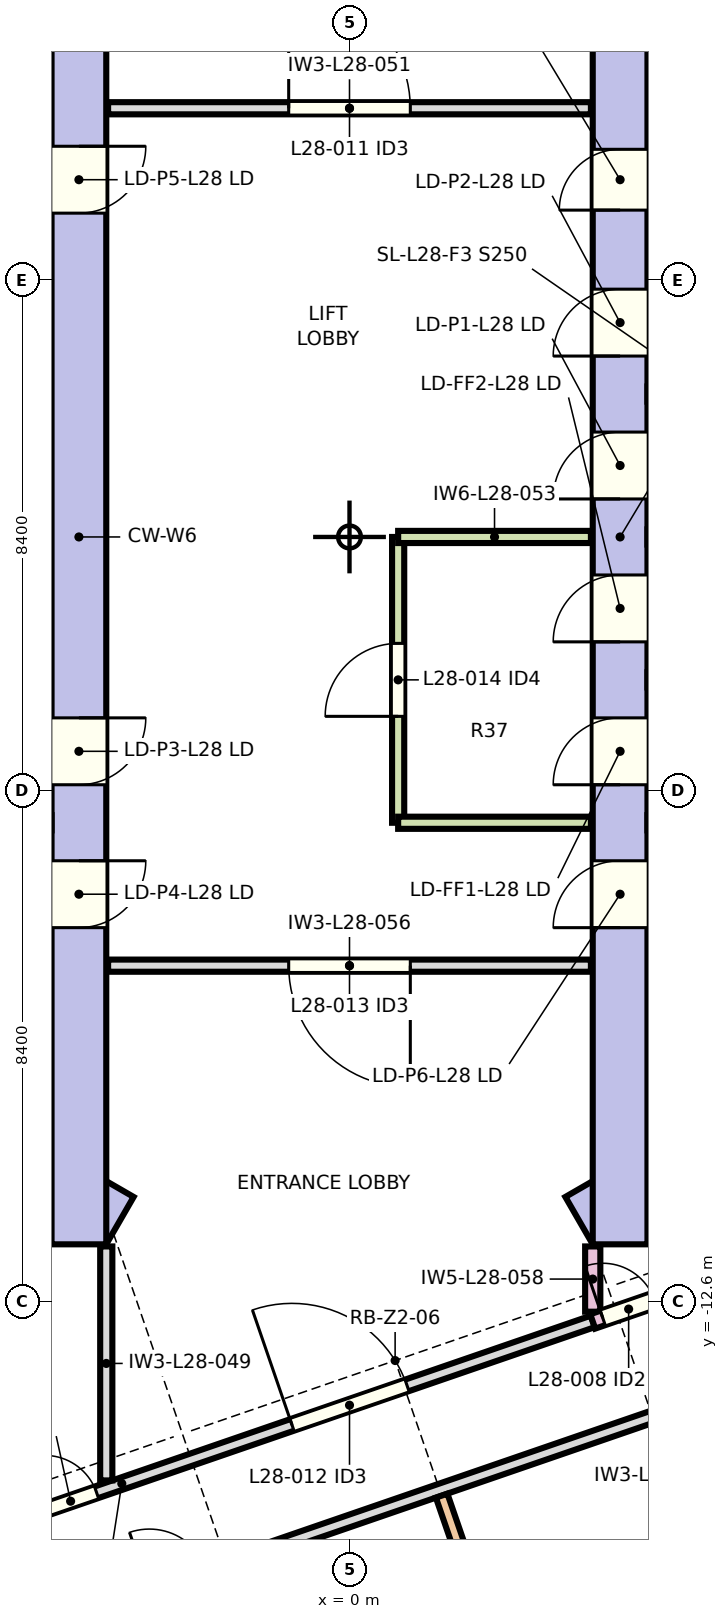
"""IFC4 building model, lengths in metres.
Left out: names, types, materials, properties, quantities, classifications, styles, units other than length and angle.
Written with IfcOpenShell. Run it as: python <this file> out.ifc"""

import sys

from ifc_helpers import new_model, si_unit, direction, frame, frame_2d, origin, place, context, subcontext, project, spatial, rectangle, extrude, element, fill, save


model = new_model("IFC4")
c1 = context("Model", 3, precision=1e-05, world=origin(), true_north=direction((0.0, 1.0)))
c2 = subcontext(c1, "Body", "Model", "MODEL_VIEW")
j1 = project(units=[si_unit("LENGTHUNIT", "METRE"), si_unit("PLANEANGLEUNIT", "RADIAN")], contexts=[c1])
p1 = place(None, origin())
s1 = spatial("IfcSite", under=j1, at=p1, CompositionType="ELEMENT")
p2 = place(p1, origin())
s2 = spatial("IfcBuilding", under=s1, at=p2, CompositionType="ELEMENT")
p3 = place(p2, frame((0.0, 0.0, 134.5)))
s3 = spatial("IfcBuildingStorey", under=s2, at=p3, CompositionType="ELEMENT", Elevation=134.5)
p4 = place(p3, frame((-3.775, -11.243, 0.0), z_axis=(0.0, 0.0, 1.0), x_axis=(-0.866026961591, 0.49999730179, 0.0)))
e1 = element("IfcWall", 1, at=p4, inside=s3, PredefinedType="SHEAR", context=c2, shape_type="SweptSolid", body=[
    extrude(rectangle(XDim=5.587, YDim=0.9, at=frame_2d((2.794, 0.0))), origin(), (0.0, 0.0, 1.0), 3.8),
])
p5 = place(p3, frame((-4.45, 11.633, 0.0), z_axis=(0.0, 0.0, 1.0), x_axis=(0.0, -1.0, 0.0)))
e2 = element("IfcWall", 2, at=p5, inside=s3, PredefinedType="SHEAR", context=c2, shape_type="SweptSolid", body=[
    extrude(rectangle(XDim=23.265, YDim=0.9, at=frame_2d((11.633, 0.0))), origin(), (0.0, 0.0, 1.0), 3.8),
])
p6 = place(p5, frame((14.607, 0.0, 0.0)))
e3 = element("IfcOpeningElement", 3, at=p6, cuts=e2, PredefinedType="OPENING", context=c2, shape_type="SweptSolid", body=[
    extrude(rectangle(XDim=1.1, YDim=2.1, at=frame_2d((0.55, 1.05))), frame((0.0, 0.46, 0.0), z_axis=(0.0, -1.0, 0.0), x_axis=(1.0, 0.0, 0.0)), (0.0, 0.0, 1.0), 0.92),
])
p7 = place(p5, frame((16.958, 0.0, 0.0)))
e4 = element("IfcOpeningElement", 4, at=p7, cuts=e2, PredefinedType="OPENING", context=c2, shape_type="SweptSolid", body=[
    extrude(rectangle(XDim=1.1, YDim=2.1, at=frame_2d((0.55, 1.05))), frame((0.0, 0.46, 0.0), z_axis=(0.0, -1.0, 0.0), x_axis=(1.0, 0.0, 0.0)), (0.0, 0.0, 1.0), 0.92),
])
p8 = place(p5, frame((5.208, 0.0, 0.0)))
e5 = element("IfcOpeningElement", 5, at=p8, cuts=e2, PredefinedType="OPENING", context=c2, shape_type="SweptSolid", body=[
    extrude(rectangle(XDim=1.1, YDim=2.1, at=frame_2d((0.55, 1.05))), frame((0.0, 0.46, 0.0), z_axis=(0.0, -1.0, 0.0), x_axis=(1.0, 0.0, 0.0)), (0.0, 0.0, 1.0), 0.92),
])
p9 = place(p3, frame((8.614, -8.449, 0.0), z_axis=(0.0, 0.0, 1.0), x_axis=(-0.866026961591, -0.49999730179, 0.0)))
e6 = element("IfcWall", 6, at=p9, inside=s3, PredefinedType="SHEAR", context=c2, shape_type="SweptSolid", body=[
    extrude(rectangle(XDim=5.587, YDim=0.9, at=frame_2d((2.794, 0.0))), origin(), (0.0, 0.0, 1.0), 3.8),
])
p10 = place(p3, frame((4.45, -11.633, 0.0), z_axis=(0.0, 0.0, 1.0), x_axis=(0.0, 1.0, 0.0)))
e7 = element("IfcWall", 7, at=p10, inside=s3, PredefinedType="SHEAR", context=c2, shape_type="SweptSolid", body=[
    extrude(rectangle(XDim=23.265, YDim=0.9, at=frame_2d((11.633, 0.0))), origin(), (0.0, 0.0, 1.0), 3.8),
])
p11 = place(p10, frame((7.558, 0.0, 0.0)))
e8 = element("IfcOpeningElement", 8, at=p11, cuts=e7, PredefinedType="OPENING", context=c2, shape_type="SweptSolid", body=[
    extrude(rectangle(XDim=1.1, YDim=2.1, at=frame_2d((0.55, 1.05))), frame((0.0, 0.46, 0.0), z_axis=(0.0, -1.0, 0.0), x_axis=(1.0, 0.0, 0.0)), (0.0, 0.0, 1.0), 0.92),
])
p12 = place(p10, frame((9.907, 0.0, 0.0)))
e9 = element("IfcOpeningElement", 9, at=p12, cuts=e7, PredefinedType="OPENING", context=c2, shape_type="SweptSolid", body=[
    extrude(rectangle(XDim=1.1, YDim=2.1, at=frame_2d((0.55, 1.05))), frame((0.0, 0.46, 0.0), z_axis=(0.0, -1.0, 0.0), x_axis=(1.0, 0.0, 0.0)), (0.0, 0.0, 1.0), 0.92),
])
p13 = place(p10, frame((12.258, 0.0, 0.0)))
e10 = element("IfcOpeningElement", 10, at=p13, cuts=e7, PredefinedType="OPENING", context=c2, shape_type="SweptSolid", body=[
    extrude(rectangle(XDim=1.1, YDim=2.1, at=frame_2d((0.55, 1.05))), frame((0.0, 0.46, 0.0), z_axis=(0.0, -1.0, 0.0), x_axis=(1.0, 0.0, 0.0)), (0.0, 0.0, 1.0), 0.92),
])
p14 = place(p10, frame((14.607, 0.0, 0.0)))
e11 = element("IfcOpeningElement", 11, at=p14, cuts=e7, PredefinedType="OPENING", context=c2, shape_type="SweptSolid", body=[
    extrude(rectangle(XDim=1.1, YDim=2.1, at=frame_2d((0.55, 1.05))), frame((0.0, 0.46, 0.0), z_axis=(0.0, -1.0, 0.0), x_axis=(1.0, 0.0, 0.0)), (0.0, 0.0, 1.0), 0.92),
])
p15 = place(p10, frame((5.208, 0.0, 0.0)))
e12 = element("IfcOpeningElement", 12, at=p15, cuts=e7, PredefinedType="OPENING", context=c2, shape_type="SweptSolid", body=[
    extrude(rectangle(XDim=1.1, YDim=2.1, at=frame_2d((0.55, 1.05))), frame((0.0, 0.46, 0.0), z_axis=(0.0, -1.0, 0.0), x_axis=(1.0, 0.0, 0.0)), (0.0, 0.0, 1.0), 0.92),
])
p16 = place(p10, frame((17.008, 0.0, 0.0)))
e13 = element("IfcOpeningElement", 13, at=p16, cuts=e7, PredefinedType="OPENING", context=c2, shape_type="SweptSolid", body=[
    extrude(rectangle(XDim=1.0, YDim=2.1, at=frame_2d((0.5, 1.05))), frame((0.0, 0.46, 0.0), z_axis=(0.0, -1.0, 0.0), x_axis=(1.0, 0.0, 0.0)), (0.0, 0.0, 1.0), 0.92),
])
p17 = place(p3, frame((-12.586, -20.515, 0.0), z_axis=(0.0, 0.0, 1.0), x_axis=(0.945519939336, 0.325564193852, 0.0)))
e14 = element("IfcWall", 14, at=p17, inside=s3, PredefinedType="PARTITIONING", context=c2, shape_type="SweptSolid", body=[
    extrude(rectangle(XDim=37.28, YDim=0.2, at=frame_2d((18.64, 0.0))), origin(), (0.0, 0.0, 1.0), 3.55),
])
p18 = place(p17, frame((9.83, 0.0, 0.0)))
e15 = element("IfcOpeningElement", 15, at=p18, cuts=e14, PredefinedType="OPENING", context=c2, shape_type="SweptSolid", body=[
    extrude(rectangle(XDim=1.0, YDim=2.1, at=frame_2d((0.5, 1.05))), frame((0.0, 0.11, 0.0), z_axis=(0.0, -1.0, 0.0), x_axis=(1.0, 0.0, 0.0)), (0.0, 0.0, 1.0), 0.22),
])
p19 = place(p17, frame((18.93, 0.0, 0.0)))
e16 = element("IfcOpeningElement", 16, at=p19, cuts=e14, PredefinedType="OPENING", context=c2, shape_type="SweptSolid", body=[
    extrude(rectangle(XDim=1.0, YDim=2.1, at=frame_2d((0.5, 1.05))), frame((0.0, 0.11, 0.0), z_axis=(0.0, -1.0, 0.0), x_axis=(1.0, 0.0, 0.0)), (0.0, 0.0, 1.0), 0.22),
])
p20 = place(p17, frame((30.28, 0.0, 0.0)))
e17 = element("IfcOpeningElement", 17, at=p20, cuts=e14, PredefinedType="OPENING", context=c2, shape_type="SweptSolid", body=[
    extrude(rectangle(XDim=1.0, YDim=2.1, at=frame_2d((0.5, 1.05))), frame((0.0, 0.11, 0.0), z_axis=(0.0, -1.0, 0.0), x_axis=(1.0, 0.0, 0.0)), (0.0, 0.0, 1.0), 0.22),
])
p21 = place(p17, frame((0.13, 0.0, 0.0)))
e18 = element("IfcOpeningElement", 18, at=p21, cuts=e14, PredefinedType="OPENING", context=c2, shape_type="SweptSolid", body=[
    extrude(rectangle(XDim=1.0, YDim=2.1, at=frame_2d((0.5, 1.05))), frame((0.0, 0.11, 0.0), z_axis=(0.0, -1.0, 0.0), x_axis=(1.0, 0.0, 0.0)), (0.0, 0.0, 1.0), 0.22),
])
p22 = place(p17, frame((34.23, 0.0, 0.0)))
e19 = element("IfcOpeningElement", 19, at=p22, cuts=e14, PredefinedType="OPENING", context=c2, shape_type="SweptSolid", body=[
    extrude(rectangle(XDim=1.1, YDim=2.1, at=frame_2d((0.55, 1.05))), frame((0.0, 0.11, 0.0), z_axis=(0.0, -1.0, 0.0), x_axis=(1.0, 0.0, 0.0)), (0.0, 0.0, 1.0), 0.22),
])
p23 = place(p3, frame((-11.49, -18.234, 0.0), z_axis=(0.0, 0.0, 1.0), x_axis=(0.945522545762, 0.325556624039, 0.0)))
e20 = element("IfcWall", 20, at=p23, inside=s3, PredefinedType="PARTITIONING", context=c2, shape_type="SweptSolid", body=[
    extrude(rectangle(XDim=16.382, YDim=0.2, at=frame_2d((8.191, 0.0))), origin(), (0.0, 0.0, 1.0), 3.55),
])
p24 = place(p23, frame((6.851, 0.0, 0.0)))
e21 = element("IfcOpeningElement", 21, at=p24, cuts=e20, PredefinedType="OPENING", context=c2, shape_type="SweptSolid", body=[
    extrude(rectangle(XDim=0.9, YDim=2.1, at=frame_2d((0.45, 1.05))), frame((0.0, 0.11, 0.0), z_axis=(0.0, -1.0, 0.0), x_axis=(1.0, 0.0, 0.0)), (0.0, 0.0, 1.0), 0.22),
])
p25 = place(p23, frame((11.152, 0.0, 0.0)))
e22 = element("IfcOpeningElement", 22, at=p25, cuts=e20, PredefinedType="OPENING", context=c2, shape_type="SweptSolid", body=[
    extrude(rectangle(XDim=2.0, YDim=2.1, at=frame_2d((1.0, 1.05))), frame((0.0, 0.11, 0.0), z_axis=(0.0, -1.0, 0.0), x_axis=(1.0, 0.0, 0.0)), (0.0, 0.0, 1.0), 0.22),
])
p26 = place(p3, frame((-4.0, -11.667, 0.0), z_axis=(0.0, 0.0, 1.0), x_axis=(0.0, -1.0, 0.0)))
e23 = element("IfcWall", 23, at=p26, inside=s3, PredefinedType="PARTITIONING", context=c2, shape_type="SweptSolid", body=[
    extrude(rectangle(XDim=3.848, YDim=0.2, at=frame_2d((1.924, 0.0))), origin(), (0.0, 0.0, 1.0), 3.55),
])
p27 = place(p3, frame((-3.97, 7.05, 0.0), z_axis=(0.0, 0.0, 1.0), x_axis=(1.0, 0.0, 0.0)))
e24 = element("IfcWall", 24, at=p27, inside=s3, PredefinedType="PARTITIONING", context=c2, shape_type="SweptSolid", body=[
    extrude(rectangle(XDim=7.94, YDim=0.2, at=frame_2d((3.97, 0.0))), origin(), (0.0, 0.0, 1.0), 3.55),
])
p28 = place(p27, frame((2.97, 0.0, 0.0)))
e25 = element("IfcOpeningElement", 25, at=p28, cuts=e24, PredefinedType="OPENING", context=c2, shape_type="SweptSolid", body=[
    extrude(rectangle(XDim=2.0, YDim=2.1, at=frame_2d((1.0, 1.05))), frame((0.0, 0.11, 0.0), z_axis=(0.0, -1.0, 0.0), x_axis=(1.0, 0.0, 0.0)), (0.0, 0.0, 1.0), 0.22),
])
p29 = place(p3, frame((0.8, -4.7, 0.0), z_axis=(0.0, 0.0, 1.0), x_axis=(0.0, 1.0, 0.0)))
e26 = element("IfcWall", 26, at=p29, inside=s3, PredefinedType="SOLIDWALL", context=c2, shape_type="SweptSolid", body=[
    extrude(rectangle(XDim=4.7, YDim=0.2, at=frame_2d((2.35, 0.0))), origin(), (0.0, 0.0, 1.0), 3.55),
])
p30 = place(p29, frame((1.75, 0.0, 0.0)))
e27 = element("IfcOpeningElement", 27, at=p30, cuts=e26, PredefinedType="OPENING", context=c2, shape_type="SweptSolid", body=[
    extrude(rectangle(XDim=1.2, YDim=2.1, at=frame_2d((0.6, 1.05))), frame((0.0, 0.11, 0.0), z_axis=(0.0, -1.0, 0.0), x_axis=(1.0, 0.0, 0.0)), (0.0, 0.0, 1.0), 0.22),
])
p31 = place(p3, frame((0.8, 0.0, 0.0), z_axis=(0.0, 0.0, 1.0), x_axis=(1.0, 0.0, 0.0)))
e28 = element("IfcWall", 28, at=p31, inside=s3, PredefinedType="SOLIDWALL", context=c2, shape_type="SweptSolid", body=[
    extrude(rectangle(XDim=3.17, YDim=0.2, at=frame_2d((1.585, 0.0))), origin(), (0.0, 0.0, 1.0), 3.55),
])
p32 = place(p3, frame((1.515, -15.766, 0.0), z_axis=(0.0, 0.0, 1.0), x_axis=(0.325563917555, -0.945520034471, 0.0)))
e29 = element("IfcWall", 29, at=p32, inside=s3, PredefinedType="PARTITIONING", context=c2, shape_type="SweptSolid", body=[
    extrude(rectangle(XDim=7.37, YDim=0.2, at=frame_2d((3.685, 0.0))), origin(), (0.0, 0.0, 1.0), 3.05),
])
p33 = place(p3, frame((3.97, -7.05, 0.0), z_axis=(0.0, 0.0, 1.0), x_axis=(-1.0, 0.0, 0.0)))
e30 = element("IfcWall", 30, at=p33, inside=s3, PredefinedType="PARTITIONING", context=c2, shape_type="SweptSolid", body=[
    extrude(rectangle(XDim=7.94, YDim=0.2, at=frame_2d((3.97, 0.0))), origin(), (0.0, 0.0, 1.0), 3.55),
])
p34 = place(p33, frame((2.97, 0.0, 0.0)))
e31 = element("IfcOpeningElement", 31, at=p34, cuts=e30, PredefinedType="OPENING", context=c2, shape_type="SweptSolid", body=[
    extrude(rectangle(XDim=2.0, YDim=2.1, at=frame_2d((1.0, 1.05))), frame((0.0, 0.11, 0.0), z_axis=(0.0, -1.0, 0.0), x_axis=(1.0, 0.0, 0.0)), (0.0, 0.0, 1.0), 0.22),
])
p35 = place(p3, frame((3.97, -4.7, 0.0), z_axis=(0.0, 0.0, 1.0), x_axis=(-1.0, 0.0, 0.0)))
e32 = element("IfcWall", 32, at=p35, inside=s3, PredefinedType="SOLIDWALL", context=c2, shape_type="SweptSolid", body=[
    extrude(rectangle(XDim=3.17, YDim=0.2, at=frame_2d((1.585, 0.0))), origin(), (0.0, 0.0, 1.0), 3.55),
])
p36 = place(p3, frame((4.0, -12.74, 0.0), z_axis=(0.0, 0.0, 1.0), x_axis=(0.0, 1.0, 0.0)))
e33 = element("IfcWall", 33, at=p36, inside=s3, PredefinedType="SOLIDWALL", context=c2, shape_type="SweptSolid", body=[
    extrude(rectangle(XDim=1.073, YDim=0.25, at=frame_2d((0.537, 0.0))), origin(), (0.0, 0.0, 1.0), 3.55),
])
p37 = place(p3, frame((4.0, -12.901, 0.0), z_axis=(0.0, 0.0, 1.0), x_axis=(0.945515789626, 0.325576245398, 0.0)))
e34 = element("IfcWall", 34, at=p37, inside=s3, PredefinedType="SOLIDWALL", context=c2, shape_type="SweptSolid", body=[
    extrude(rectangle(XDim=12.491, YDim=0.25, at=frame_2d((6.246, 0.0))), origin(), (0.0, 0.0, 1.0), 3.55),
])
p38 = place(p37, frame((0.175, 0.0, 0.0)))
e35 = element("IfcOpeningElement", 35, at=p38, cuts=e34, PredefinedType="OPENING", context=c2, shape_type="SweptSolid", body=[
    extrude(rectangle(XDim=0.9, YDim=2.1, at=frame_2d((0.45, 1.05))), frame((0.0, 0.135, 0.0), z_axis=(0.0, -1.0, 0.0), x_axis=(1.0, 0.0, 0.0)), (0.0, 0.0, 1.0), 0.27),
])
p39 = place(p37, frame((5.796, 0.0, 0.0)))
e36 = element("IfcOpeningElement", 36, at=p39, cuts=e34, PredefinedType="OPENING", context=c2, shape_type="SweptSolid", body=[
    extrude(rectangle(XDim=0.9, YDim=2.1, at=frame_2d((0.45, 1.05))), frame((0.0, 0.135, 0.0), z_axis=(0.0, -1.0, 0.0), x_axis=(1.0, 0.0, 0.0)), (0.0, 0.0, 1.0), 0.27),
])
p40 = place(p3, frame((4.599, 15.862, 0.0), z_axis=(0.0, 0.0, 1.0), x_axis=(-0.94551912499, -0.325566558907, 0.0)))
e37 = element("IfcWall", 37, at=p40, inside=s3, PredefinedType="PARTITIONING", context=c2, shape_type="SweptSolid", body=[
    extrude(rectangle(XDim=26.293, YDim=0.2, at=frame_2d((13.146, 0.0))), origin(), (0.0, 0.0, 1.0), 3.55),
])
p41 = place(p40, frame((10.81, 0.0, 0.0)))
e38 = element("IfcOpeningElement", 38, at=p41, cuts=e37, PredefinedType="OPENING", context=c2, shape_type="SweptSolid", body=[
    extrude(rectangle(XDim=0.9, YDim=2.1, at=frame_2d((0.45, 1.05))), frame((0.0, 0.11, 0.0), z_axis=(0.0, -1.0, 0.0), x_axis=(1.0, 0.0, 0.0)), (0.0, 0.0, 1.0), 0.22),
])
p42 = place(p40, frame((3.865, 0.0, 0.0)))
e39 = element("IfcOpeningElement", 39, at=p42, cuts=e37, PredefinedType="OPENING", context=c2, shape_type="SweptSolid", body=[
    extrude(rectangle(XDim=2.0, YDim=2.1, at=frame_2d((1.0, 1.05))), frame((0.0, 0.11, 0.0), z_axis=(0.0, -1.0, 0.0), x_axis=(1.0, 0.0, 0.0)), (0.0, 0.0, 1.0), 0.22),
])
for number, where, z_axis, x_axis in (
    (40, (4.9, -4.7, 0.0), (0.0, 0.0, 1.0), (1.0, 0.0, 0.0)),
    (41, (4.9, 0.0, 0.0), (0.0, 0.0, 1.0), (1.0, 0.0, 0.0)),
):
    element("IfcWall", number, at=place(p3, frame(where, z_axis=z_axis, x_axis=x_axis)), inside=s3, PredefinedType="SOLIDWALL", context=c2, shape_type="SweptSolid", body=[
        extrude(rectangle(XDim=2.675, YDim=0.25, at=frame_2d((1.337, 0.0))), origin(), (0.0, 0.0, 1.0), 3.55),
    ])
p43 = place(p24, origin())
e42 = element("IfcDoor", 42, at=p43, inside=s3, OperationType="NOTDEFINED", PredefinedType="DOOR", context=c2, shape_type="SweptSolid", body=[
    extrude(rectangle(XDim=0.9, YDim=2.1, at=frame_2d((0.45, 1.05))), frame((0.0, 0.025, 0.0), z_axis=(0.0, -1.0, 0.0), x_axis=(1.0, 0.0, 0.0)), (0.0, 0.0, 1.0), 0.05),
])
fill(e21, e42)
p44 = place(p38, origin())
e43 = element("IfcDoor", 43, at=p44, inside=s3, OperationType="NOTDEFINED", PredefinedType="DOOR", context=c2, shape_type="SweptSolid", body=[
    extrude(rectangle(XDim=0.9, YDim=2.1, at=frame_2d((0.45, 1.05))), frame((0.0, 0.025, 0.0), z_axis=(0.0, -1.0, 0.0), x_axis=(1.0, 0.0, 0.0)), (0.0, 0.0, 1.0), 0.05),
])
fill(e35, e43)
p45 = place(p28, origin())
e44 = element("IfcDoor", 44, at=p45, inside=s3, OperationType="NOTDEFINED", PredefinedType="DOOR", context=c2, shape_type="SweptSolid", body=[
    extrude(rectangle(XDim=2.0, YDim=2.1, at=frame_2d((1.0, 1.05))), frame((0.0, 0.025, 0.0), z_axis=(0.0, -1.0, 0.0), x_axis=(1.0, 0.0, 0.0)), (0.0, 0.0, 1.0), 0.05),
])
fill(e25, e44)
p46 = place(p25, origin())
e45 = element("IfcDoor", 45, at=p46, inside=s3, OperationType="NOTDEFINED", PredefinedType="DOOR", context=c2, shape_type="SweptSolid", body=[
    extrude(rectangle(XDim=2.0, YDim=2.1, at=frame_2d((1.0, 1.05))), frame((0.0, 0.025, 0.0), z_axis=(0.0, -1.0, 0.0), x_axis=(1.0, 0.0, 0.0)), (0.0, 0.0, 1.0), 0.05),
])
fill(e22, e45)
p47 = place(p34, origin())
e46 = element("IfcDoor", 46, at=p47, inside=s3, OperationType="NOTDEFINED", PredefinedType="DOOR", context=c2, shape_type="SweptSolid", body=[
    extrude(rectangle(XDim=2.0, YDim=2.1, at=frame_2d((1.0, 1.05))), frame((0.0, 0.025, 0.0), z_axis=(0.0, -1.0, 0.0), x_axis=(1.0, 0.0, 0.0)), (0.0, 0.0, 1.0), 0.05),
])
fill(e31, e46)
p48 = place(p30, origin())
e47 = element("IfcDoor", 47, at=p48, inside=s3, OperationType="NOTDEFINED", PredefinedType="DOOR", context=c2, shape_type="SweptSolid", body=[
    extrude(rectangle(XDim=1.2, YDim=2.1, at=frame_2d((0.6, 1.05))), frame((0.0, 0.025, 0.0), z_axis=(0.0, -1.0, 0.0), x_axis=(1.0, 0.0, 0.0)), (0.0, 0.0, 1.0), 0.05),
])
fill(e27, e47)
p49 = place(p11, origin())
e48 = element("IfcDoor", 48, at=p49, inside=s3, OperationType="SLIDING_TO_LEFT", PredefinedType="DOOR", context=c2, shape_type="SweptSolid", body=[
    extrude(rectangle(XDim=1.1, YDim=2.1, at=frame_2d((0.55, 1.05))), frame((0.0, 0.025, 0.0), z_axis=(0.0, -1.0, 0.0), x_axis=(1.0, 0.0, 0.0)), (0.0, 0.0, 1.0), 0.05),
])
fill(e8, e48)
p50 = place(p12, origin())
e49 = element("IfcDoor", 49, at=p50, inside=s3, OperationType="SLIDING_TO_LEFT", PredefinedType="DOOR", context=c2, shape_type="SweptSolid", body=[
    extrude(rectangle(XDim=1.1, YDim=2.1, at=frame_2d((0.55, 1.05))), frame((0.0, 0.025, 0.0), z_axis=(0.0, -1.0, 0.0), x_axis=(1.0, 0.0, 0.0)), (0.0, 0.0, 1.0), 0.05),
])
fill(e9, e49)
p51 = place(p13, origin())
e50 = element("IfcDoor", 50, at=p51, inside=s3, OperationType="SLIDING_TO_LEFT", PredefinedType="DOOR", context=c2, shape_type="SweptSolid", body=[
    extrude(rectangle(XDim=1.1, YDim=2.1, at=frame_2d((0.55, 1.05))), frame((0.0, 0.025, 0.0), z_axis=(0.0, -1.0, 0.0), x_axis=(1.0, 0.0, 0.0)), (0.0, 0.0, 1.0), 0.05),
])
fill(e10, e50)
p52 = place(p14, origin())
e51 = element("IfcDoor", 51, at=p52, inside=s3, OperationType="SLIDING_TO_LEFT", PredefinedType="DOOR", context=c2, shape_type="SweptSolid", body=[
    extrude(rectangle(XDim=1.1, YDim=2.1, at=frame_2d((0.55, 1.05))), frame((0.0, 0.025, 0.0), z_axis=(0.0, -1.0, 0.0), x_axis=(1.0, 0.0, 0.0)), (0.0, 0.0, 1.0), 0.05),
])
fill(e11, e51)
p53 = place(p6, origin())
e52 = element("IfcDoor", 52, at=p53, inside=s3, OperationType="SLIDING_TO_LEFT", PredefinedType="DOOR", context=c2, shape_type="SweptSolid", body=[
    extrude(rectangle(XDim=1.1, YDim=2.1, at=frame_2d((0.55, 1.05))), frame((0.0, 0.025, 0.0), z_axis=(0.0, -1.0, 0.0), x_axis=(1.0, 0.0, 0.0)), (0.0, 0.0, 1.0), 0.05),
])
fill(e3, e52)
p54 = place(p7, origin())
e53 = element("IfcDoor", 53, at=p54, inside=s3, OperationType="SLIDING_TO_LEFT", PredefinedType="DOOR", context=c2, shape_type="SweptSolid", body=[
    extrude(rectangle(XDim=1.1, YDim=2.1, at=frame_2d((0.55, 1.05))), frame((0.0, 0.025, 0.0), z_axis=(0.0, -1.0, 0.0), x_axis=(1.0, 0.0, 0.0)), (0.0, 0.0, 1.0), 0.05),
])
fill(e4, e53)
p55 = place(p8, origin())
e54 = element("IfcDoor", 54, at=p55, inside=s3, OperationType="SLIDING_TO_LEFT", PredefinedType="DOOR", context=c2, shape_type="SweptSolid", body=[
    extrude(rectangle(XDim=1.1, YDim=2.1, at=frame_2d((0.55, 1.05))), frame((0.0, 0.025, 0.0), z_axis=(0.0, -1.0, 0.0), x_axis=(1.0, 0.0, 0.0)), (0.0, 0.0, 1.0), 0.05),
])
fill(e5, e54)
p56 = place(p15, origin())
e55 = element("IfcDoor", 55, at=p56, inside=s3, OperationType="SLIDING_TO_LEFT", PredefinedType="DOOR", context=c2, shape_type="SweptSolid", body=[
    extrude(rectangle(XDim=1.1, YDim=2.1, at=frame_2d((0.55, 1.05))), frame((0.0, 0.025, 0.0), z_axis=(0.0, -1.0, 0.0), x_axis=(1.0, 0.0, 0.0)), (0.0, 0.0, 1.0), 0.05),
])
fill(e12, e55)
p57 = place(p16, origin())
e56 = element("IfcDoor", 56, at=p57, inside=s3, OperationType="NOTDEFINED", PredefinedType="DOOR", context=c2, shape_type="SweptSolid", body=[
    extrude(rectangle(XDim=1.0, YDim=2.1, at=frame_2d((0.5, 1.05))), frame((0.0, 0.025, 0.0), z_axis=(0.0, -1.0, 0.0), x_axis=(1.0, 0.0, 0.0)), (0.0, 0.0, 1.0), 0.05),
])
fill(e13, e56)
save(model, sys.argv[1])
